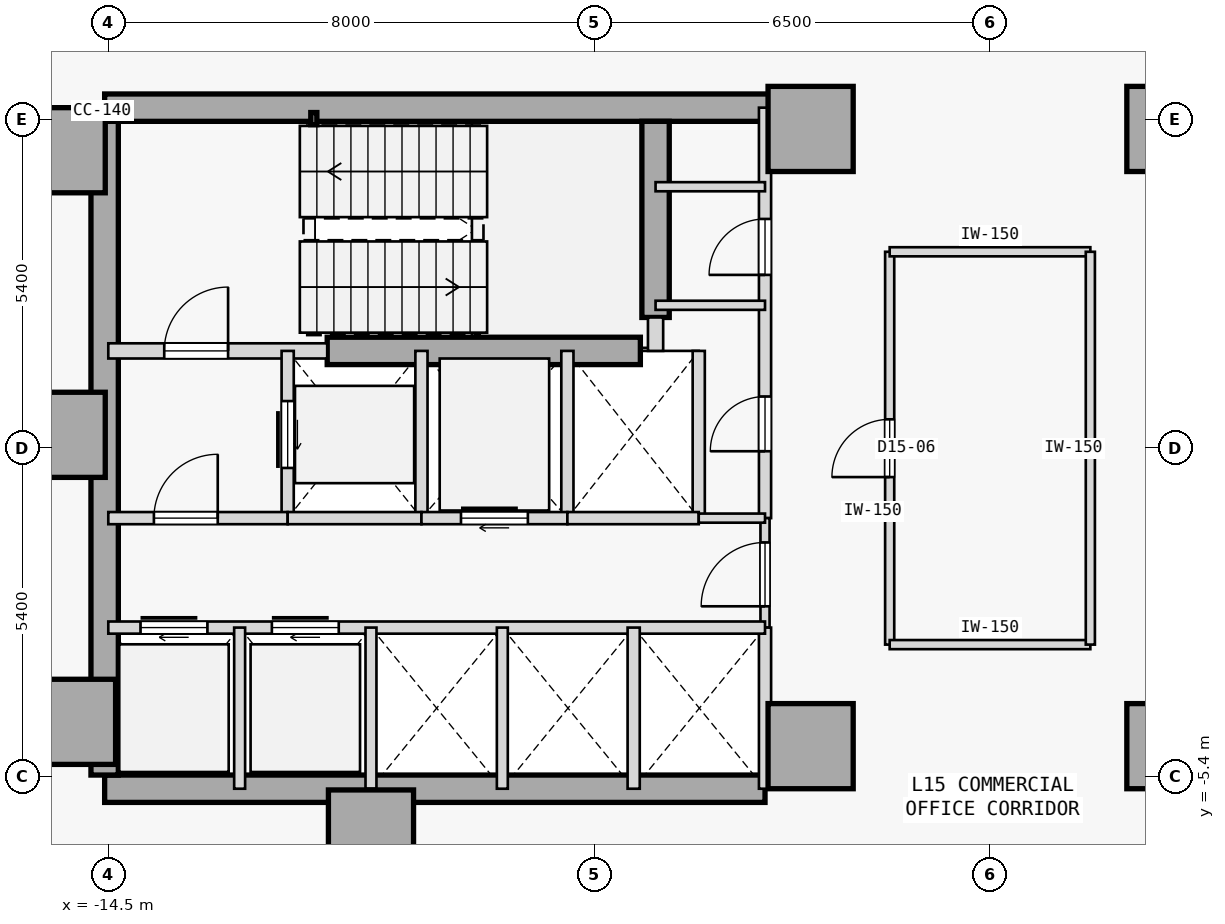
"""IFC4 building model, lengths in metres.
Left out: names, types, materials, properties, quantities, classifications, styles, units other than length and angle.
Written with IfcOpenShell. Run it as: python <this file> out.ifc"""

import sys

from ifc_helpers import new_model, si_unit, direction, frame, frame_2d, origin, origin_2d, place, context, subcontext, project, spatial, rectangle, hollow_rectangle, extrude, element, fill, save


model = new_model("IFC4")
c1 = context("Model", 3, precision=1e-05, world=origin(), true_north=direction((0.0, 1.0)))
c2 = subcontext(c1, "Body", "Model", "MODEL_VIEW")
j1 = project(units=[si_unit("LENGTHUNIT", "METRE"), si_unit("PLANEANGLEUNIT", "RADIAN")], contexts=[c1])
p1 = place(None, origin())
s1 = spatial("IfcSite", under=j1, at=p1, CompositionType="ELEMENT")
p2 = place(p1, origin())
s2 = spatial("IfcBuilding", under=s1, at=p2, CompositionType="ELEMENT")
p3 = place(p2, frame((0.0, 0.0, 63.6)))
s3 = spatial("IfcBuildingStorey", under=s2, at=p3, CompositionType="ELEMENT", Elevation=63.6)
for number, where, z_axis, x_axis in (
    (1, (-15.25, 4.9, 0.0), (0.0, 0.0, 1.0), (1.0, 0.0, 0.0)),
    (2, (-15.25, 0.22, 0.0), (0.0, 0.0, 1.0), (1.0, 0.0, 0.0)),
    (3, (-15.08, -4.5, 0.0), (0.0, 0.0, 1.0), (1.0, 0.0, 0.0)),
    (4, (-10.18, -6.32, 0.0), (0.0, 0.0, 1.0), (1.0, 0.0, 0.0)),
    (5, (-2.95, -4.9, 0.0), (0.0, 0.0, 1.0), (1.0, 0.0, 0.0)),
    (6, (-2.95, 5.25, 0.0), (0.0, 0.0, 1.0), (1.0, 0.0, 0.0)),
    (7, (2.95, -4.9, 0.0), (0.0, 0.0, 1.0), (1.0, 0.0, 0.0)),
    (8, (2.95, 5.25, 0.0), (0.0, 0.0, 1.0), (1.0, 0.0, 0.0)),
):
    element("IfcColumn", number, at=place(p3, frame(where, z_axis=z_axis, x_axis=x_axis)), inside=s3, PredefinedType="COLUMN", context=c2, shape_type="SweptSolid", body=[
        extrude(rectangle(XDim=1.4, YDim=1.4, at=origin_2d()), origin(), (0.0, 0.0, 1.0), 3.8),
    ])
p4 = place(p3, frame((-14.56, 5.6, 0.0), z_axis=(0.0, 0.0, 1.0), x_axis=(1.0, 0.0, 0.0)))
e9 = element("IfcWall", 9, at=p4, inside=s3, PredefinedType="SHEAR", context=c2, shape_type="SweptSolid", body=[
    extrude(rectangle(XDim=11.41, YDim=0.45, at=frame_2d((5.705, 0.0))), origin(), (0.0, 0.0, 1.0), 3.575),
])
p5 = place(p3, frame((-14.56, -5.6, 0.0), z_axis=(0.0, 0.0, 1.0), x_axis=(1.0, 0.0, 0.0)))
e10 = element("IfcWall", 10, at=p5, inside=s3, PredefinedType="SHEAR", context=c2, shape_type="SweptSolid", body=[
    extrude(rectangle(XDim=10.86, YDim=0.45, at=frame_2d((5.43, 0.0))), origin(), (0.0, 0.0, 1.0), 3.575),
])
p6 = place(p3, frame((-14.56, -5.375, 0.0), z_axis=(0.0, 0.0, 1.0), x_axis=(0.0, 1.0, 0.0)))
e11 = element("IfcWall", 11, at=p6, inside=s3, PredefinedType="SHEAR", context=c2, shape_type="SweptSolid", body=[
    extrude(rectangle(XDim=10.75, YDim=0.45, at=frame_2d((5.375, 0.0))), origin(), (0.0, 0.0, 1.0), 3.575),
])
p7 = place(p3, frame((-5.5, 2.15, 0.0), z_axis=(0.0, 0.0, 1.0), x_axis=(0.0, 1.0, 0.0)))
e12 = element("IfcWall", 12, at=p7, inside=s3, PredefinedType="SHEAR", context=c2, shape_type="SweptSolid", body=[
    extrude(rectangle(XDim=3.225, YDim=0.45, at=frame_2d((1.613, 0.0))), origin(), (0.0, 0.0, 1.0), 3.575),
])
p8 = place(p3, frame((-10.9, 1.6, 0.0), z_axis=(0.0, 0.0, 1.0), x_axis=(1.0, 0.0, 0.0)))
e13 = element("IfcWall", 13, at=p8, inside=s3, PredefinedType="SHEAR", context=c2, shape_type="SweptSolid", body=[
    extrude(rectangle(XDim=5.15, YDim=0.45, at=frame_2d((2.575, 0.0))), origin(), (0.0, 0.0, 1.0), 3.575),
])
p9 = place(p3, frame((-11.12, 5.42, 0.0), z_axis=(0.0, 0.0, 1.0), x_axis=(1.0, 0.0, 0.0)))
e14 = element("IfcColumn", 14, at=p9, inside=s3, PredefinedType="COLUMN", context=c2, shape_type="SweptSolid", body=[
    extrude(hollow_rectangle(XDim=0.1, YDim=0.2, WallThickness=0.008, at=origin_2d()), origin(), (0.0, 0.0, 1.0), 3.8),
])
p10 = place(p3, frame((-14.5, 1.6, 0.0), z_axis=(0.0, 0.0, 1.0), x_axis=(1.0, 0.0, 0.0)))
e15 = element("IfcWall", 15, at=p10, inside=s3, PredefinedType="STANDARD", context=c2, shape_type="SweptSolid", body=[
    extrude(rectangle(XDim=3.6, YDim=0.25, at=frame_2d((1.8, 0.0))), origin(), (0.0, 0.0, 1.0), 3.575),
])
p11 = place(p10, frame((0.92, 0.0, 0.0)))
e16 = element("IfcOpeningElement", 16, at=p11, cuts=e15, PredefinedType="OPENING", context=c2, shape_type="SweptSolid", body=[
    extrude(rectangle(XDim=1.05, YDim=2.15, at=frame_2d((0.525, 1.075))), frame((0.0, 0.135, 0.0), z_axis=(0.0, -1.0, 0.0), x_axis=(1.0, 0.0, 0.0)), (0.0, 0.0, 1.0), 0.27),
])
p12 = place(p3, frame((-5.5, 1.6, 0.0), z_axis=(0.0, 0.0, 1.0), x_axis=(0.0, 1.0, 0.0)))
e17 = element("IfcWall", 17, at=p12, inside=s3, PredefinedType="STANDARD", context=c2, shape_type="SweptSolid", body=[
    extrude(rectangle(XDim=0.55, YDim=0.25, at=frame_2d((0.275, 0.0))), origin(), (0.0, 0.0, 1.0), 3.575),
])
p13 = place(p3, frame((-3.7, -1.15, 0.0), z_axis=(0.0, 0.0, 1.0), x_axis=(0.0, 1.0, 0.0)))
e18 = element("IfcWall", 18, at=p13, inside=s3, PredefinedType="STANDARD", context=c2, shape_type="SweptSolid", body=[
    extrude(rectangle(XDim=6.75, YDim=0.2, at=frame_2d((3.375, 0.0))), origin(), (0.0, 0.0, 1.0), 3.575),
])
p14 = place(p13, frame((1.1, 0.0, 0.0)))
e19 = element("IfcOpeningElement", 19, at=p14, cuts=e18, PredefinedType="OPENING", context=c2, shape_type="SweptSolid", body=[
    extrude(rectangle(XDim=0.9, YDim=2.15, at=frame_2d((0.45, 1.075))), frame((0.0, 0.11, 0.0), z_axis=(0.0, -1.0, 0.0), x_axis=(1.0, 0.0, 0.0)), (0.0, 0.0, 1.0), 0.22),
])
p15 = place(p13, frame((4.0, 0.0, 0.0)))
e20 = element("IfcOpeningElement", 20, at=p15, cuts=e18, PredefinedType="OPENING", context=c2, shape_type="SweptSolid", body=[
    extrude(rectangle(XDim=0.92, YDim=2.15, at=frame_2d((0.46, 1.075))), frame((0.0, 0.11, 0.0), z_axis=(0.0, -1.0, 0.0), x_axis=(1.0, 0.0, 0.0)), (0.0, 0.0, 1.0), 0.22),
])
p16 = place(p3, frame((-3.7, -2.95, 0.0), z_axis=(0.0, 0.0, 1.0), x_axis=(0.0, 1.0, 0.0)))
e21 = element("IfcWall", 21, at=p16, inside=s3, PredefinedType="PARTITIONING", context=c2, shape_type="SweptSolid", body=[
    extrude(rectangle(XDim=1.8, YDim=0.15, at=frame_2d((0.9, 0.0))), origin(), (0.0, 0.0, 1.0), 3.575),
])
p17 = place(p16, frame((0.35, 0.0, 0.0)))
e22 = element("IfcOpeningElement", 22, at=p17, cuts=e21, PredefinedType="OPENING", context=c2, shape_type="SweptSolid", body=[
    extrude(rectangle(XDim=1.05, YDim=2.18, at=frame_2d((0.525, 1.09))), frame((0.0, 0.085, 0.0), z_axis=(0.0, -1.0, 0.0), x_axis=(1.0, 0.0, 0.0)), (0.0, 0.0, 1.0), 0.17),
])
p18 = place(p3, frame((-3.7, -5.6, 0.0), z_axis=(0.0, 0.0, 1.0), x_axis=(0.0, 1.0, 0.0)))
e23 = element("IfcWall", 23, at=p18, inside=s3, PredefinedType="STANDARD", context=c2, shape_type="SweptSolid", body=[
    extrude(rectangle(XDim=2.65, YDim=0.2, at=frame_2d((1.325, 0.0))), origin(), (0.0, 0.0, 1.0), 3.575),
])
p19 = place(p3, frame((-11.55, -1.15, 0.0), z_axis=(0.0, 0.0, 1.0), x_axis=(0.0, 1.0, 0.0)))
e24 = element("IfcWall", 24, at=p19, inside=s3, PredefinedType="STANDARD", context=c2, shape_type="SweptSolid", body=[
    extrude(rectangle(XDim=2.75, YDim=0.2, at=frame_2d((1.375, 0.0))), origin(), (0.0, 0.0, 1.0), 3.575),
])
p20 = place(p19, frame((0.825, 0.0, 0.0)))
e25 = element("IfcOpeningElement", 25, at=p20, cuts=e24, PredefinedType="OPENING", context=c2, shape_type="SweptSolid", body=[
    extrude(rectangle(XDim=1.1, YDim=2.15, at=frame_2d((0.55, 1.075))), frame((0.0, 0.11, 0.0), z_axis=(0.0, -1.0, 0.0), x_axis=(1.0, 0.0, 0.0)), (0.0, 0.0, 1.0), 0.22),
])
p21 = place(p3, frame((-9.35, -1.15, 0.0), z_axis=(0.0, 0.0, 1.0), x_axis=(0.0, 1.0, 0.0)))
e26 = element("IfcWall", 26, at=p21, inside=s3, PredefinedType="STANDARD", context=c2, shape_type="SweptSolid", body=[
    extrude(rectangle(XDim=2.75, YDim=0.2, at=frame_2d((1.375, 0.0))), origin(), (0.0, 0.0, 1.0), 3.575),
])
p22 = place(p3, frame((-14.5, -1.15, 0.0), z_axis=(0.0, 0.0, 1.0), x_axis=(1.0, 0.0, 0.0)))
e27 = element("IfcWall", 27, at=p22, inside=s3, PredefinedType="STANDARD", context=c2, shape_type="SweptSolid", body=[
    extrude(rectangle(XDim=2.95, YDim=0.2, at=frame_2d((1.475, 0.0))), origin(), (0.0, 0.0, 1.0), 3.575),
])
p23 = place(p22, frame((0.75, 0.0, 0.0)))
e28 = element("IfcOpeningElement", 28, at=p23, cuts=e27, PredefinedType="OPENING", context=c2, shape_type="SweptSolid", body=[
    extrude(rectangle(XDim=1.05, YDim=2.18, at=frame_2d((0.525, 1.09))), frame((0.0, 0.11, 0.0), z_axis=(0.0, -1.0, 0.0), x_axis=(1.0, 0.0, 0.0)), (0.0, 0.0, 1.0), 0.22),
])
p24 = place(p3, frame((-11.55, -1.15, 0.0), z_axis=(0.0, 0.0, 1.0), x_axis=(1.0, 0.0, 0.0)))
e29 = element("IfcWall", 29, at=p24, inside=s3, PredefinedType="STANDARD", context=c2, shape_type="SweptSolid", body=[
    extrude(rectangle(XDim=2.2, YDim=0.2, at=frame_2d((1.1, 0.0))), origin(), (0.0, 0.0, 1.0), 3.575),
])
p25 = place(p3, frame((-6.95, -1.15, 0.0), z_axis=(0.0, 0.0, 1.0), x_axis=(0.0, 1.0, 0.0)))
e30 = element("IfcWall", 30, at=p25, inside=s3, PredefinedType="STANDARD", context=c2, shape_type="SweptSolid", body=[
    extrude(rectangle(XDim=2.75, YDim=0.2, at=frame_2d((1.375, 0.0))), origin(), (0.0, 0.0, 1.0), 3.575),
])
p26 = place(p3, frame((-9.35, -1.15, 0.0), z_axis=(0.0, 0.0, 1.0), x_axis=(1.0, 0.0, 0.0)))
e31 = element("IfcWall", 31, at=p26, inside=s3, PredefinedType="STANDARD", context=c2, shape_type="SweptSolid", body=[
    extrude(rectangle(XDim=2.4, YDim=0.2, at=frame_2d((1.2, 0.0))), origin(), (0.0, 0.0, 1.0), 3.575),
])
p27 = place(p26, frame((0.65, 0.0, 0.0)))
e32 = element("IfcOpeningElement", 32, at=p27, cuts=e31, PredefinedType="OPENING", context=c2, shape_type="SweptSolid", body=[
    extrude(rectangle(XDim=1.1, YDim=2.15, at=frame_2d((0.55, 1.075))), frame((0.0, 0.11, 0.0), z_axis=(0.0, -1.0, 0.0), x_axis=(1.0, 0.0, 0.0)), (0.0, 0.0, 1.0), 0.22),
])
p28 = place(p3, frame((-4.79, -1.15, 0.0), z_axis=(0.0, 0.0, 1.0), x_axis=(0.0, 1.0, 0.0)))
e33 = element("IfcWall", 33, at=p28, inside=s3, PredefinedType="STANDARD", context=c2, shape_type="SweptSolid", body=[
    extrude(rectangle(XDim=2.75, YDim=0.2, at=frame_2d((1.375, 0.0))), origin(), (0.0, 0.0, 1.0), 3.575),
])
p29 = place(p3, frame((-6.95, -1.15, 0.0), z_axis=(0.0, 0.0, 1.0), x_axis=(1.0, 0.0, 0.0)))
e34 = element("IfcWall", 34, at=p29, inside=s3, PredefinedType="STANDARD", context=c2, shape_type="SweptSolid", body=[
    extrude(rectangle(XDim=2.16, YDim=0.2, at=frame_2d((1.08, 0.0))), origin(), (0.0, 0.0, 1.0), 3.575),
])
p30 = place(p3, frame((-4.79, -1.15, 0.0), z_axis=(0.0, 0.0, 1.0), x_axis=(1.0, 0.0, 0.0)))
e35 = element("IfcWall", 35, at=p30, inside=s3, PredefinedType="PARTITIONING", context=c2, shape_type="SweptSolid", body=[
    extrude(rectangle(XDim=1.09, YDim=0.15, at=frame_2d((0.545, 0.0))), origin(), (0.0, 0.0, 1.0), 3.575),
])
p31 = place(p3, frame((-14.5, -2.95, 0.0), z_axis=(0.0, 0.0, 1.0), x_axis=(1.0, 0.0, 0.0)))
e36 = element("IfcWall", 36, at=p31, inside=s3, PredefinedType="STANDARD", context=c2, shape_type="SweptSolid", body=[
    extrude(rectangle(XDim=10.8, YDim=0.2, at=frame_2d((5.4, 0.0))), origin(), (0.0, 0.0, 1.0), 3.575),
])
p32 = place(p31, frame((0.53, 0.0, 0.0)))
e37 = element("IfcOpeningElement", 37, at=p32, cuts=e36, PredefinedType="OPENING", context=c2, shape_type="SweptSolid", body=[
    extrude(rectangle(XDim=1.1, YDim=2.15, at=frame_2d((0.55, 1.075))), frame((0.0, 0.11, 0.0), z_axis=(0.0, -1.0, 0.0), x_axis=(1.0, 0.0, 0.0)), (0.0, 0.0, 1.0), 0.22),
])
p33 = place(p31, frame((2.69, 0.0, 0.0)))
e38 = element("IfcOpeningElement", 38, at=p33, cuts=e36, PredefinedType="OPENING", context=c2, shape_type="SweptSolid", body=[
    extrude(rectangle(XDim=1.1, YDim=2.15, at=frame_2d((0.55, 1.075))), frame((0.0, 0.11, 0.0), z_axis=(0.0, -1.0, 0.0), x_axis=(1.0, 0.0, 0.0)), (0.0, 0.0, 1.0), 0.22),
])
p34 = place(p3, frame((-5.86, -5.6, 0.0), z_axis=(0.0, 0.0, 1.0), x_axis=(0.0, 1.0, 0.0)))
e39 = element("IfcWall", 39, at=p34, inside=s3, PredefinedType="STANDARD", context=c2, shape_type="SweptSolid", body=[
    extrude(rectangle(XDim=2.65, YDim=0.2, at=frame_2d((1.325, 0.0))), origin(), (0.0, 0.0, 1.0), 3.575),
])
for number, where, z_axis, x_axis in (
    (40, (-12.34, -5.6, 0.0), (0.0, 0.0, 1.0), (0.0, 1.0, 0.0)),
    (41, (-10.18, -5.6, 0.0), (0.0, 0.0, 1.0), (0.0, 1.0, 0.0)),
    (42, (-8.02, -5.6, 0.0), (0.0, 0.0, 1.0), (0.0, 1.0, 0.0)),
):
    element("IfcWall", number, at=place(p3, frame(where, z_axis=z_axis, x_axis=x_axis)), inside=s3, PredefinedType="STANDARD", context=c2, shape_type="SweptSolid", body=[
        extrude(rectangle(XDim=2.65, YDim=0.18, at=frame_2d((1.325, 0.0))), origin(), (0.0, 0.0, 1.0), 3.575),
    ])
for number, where, z_axis, x_axis in (
    (43, (-5.5, 4.3, 0.0), (0.0, 0.0, 1.0), (1.0, 0.0, 0.0)),
    (44, (-5.5, 2.35, 0.0), (0.0, 0.0, 1.0), (1.0, 0.0, 0.0)),
):
    element("IfcWall", number, at=place(p3, frame(where, z_axis=z_axis, x_axis=x_axis)), inside=s3, PredefinedType="PARTITIONING", context=c2, shape_type="SweptSolid", body=[
        extrude(rectangle(XDim=1.8, YDim=0.15, at=frame_2d((0.9, 0.0))), origin(), (0.0, 0.0, 1.0), 3.575),
    ])
p35 = place(p3, frame((-1.65, -3.23, 0.0), z_axis=(0.0, 0.0, 1.0), x_axis=(0.0, 1.0, 0.0)))
e45 = element("IfcWall", 45, at=p35, inside=s3, PredefinedType="PARTITIONING", context=c2, shape_type="SweptSolid", body=[
    extrude(rectangle(XDim=6.46, YDim=0.15, at=frame_2d((3.23, 0.0))), origin(), (0.0, 0.0, 1.0), 3.575),
])
p36 = place(p35, frame((2.755, 0.0, 0.0)))
e46 = element("IfcOpeningElement", 46, at=p36, cuts=e45, PredefinedType="OPENING", context=c2, shape_type="SweptSolid", body=[
    extrude(rectangle(XDim=0.95, YDim=2.15, at=frame_2d((0.475, 1.075))), frame((0.0, 0.085, 0.0), z_axis=(0.0, -1.0, 0.0), x_axis=(1.0, 0.0, 0.0)), (0.0, 0.0, 1.0), 0.17),
])
for number, where, z_axis, x_axis in (
    (47, (-1.65, -3.23, 0.0), (0.0, 0.0, 1.0), (1.0, 0.0, 0.0)),
    (48, (-1.65, 3.23, 0.0), (0.0, 0.0, 1.0), (1.0, 0.0, 0.0)),
):
    element("IfcWall", number, at=place(p3, frame(where, z_axis=z_axis, x_axis=x_axis)), inside=s3, PredefinedType="PARTITIONING", context=c2, shape_type="SweptSolid", body=[
        extrude(rectangle(XDim=3.3, YDim=0.15, at=frame_2d((1.65, 0.0))), origin(), (0.0, 0.0, 1.0), 3.575),
    ])
p37 = place(p3, frame((1.65, -3.23, 0.0), z_axis=(0.0, 0.0, 1.0), x_axis=(0.0, 1.0, 0.0)))
e49 = element("IfcWall", 49, at=p37, inside=s3, PredefinedType="PARTITIONING", context=c2, shape_type="SweptSolid", body=[
    extrude(rectangle(XDim=6.46, YDim=0.15, at=frame_2d((3.23, 0.0))), origin(), (0.0, 0.0, 1.0), 3.575),
])
p38 = place(p11, origin())
e50 = element("IfcDoor", 50, at=p38, inside=s3, OperationType="SINGLE_SWING_RIGHT", PredefinedType="DOOR", context=c2, shape_type="SweptSolid", body=[
    extrude(rectangle(XDim=1.05, YDim=2.15, at=frame_2d((0.525, 1.075))), frame((0.0, 0.025, 0.0), z_axis=(0.0, -1.0, 0.0), x_axis=(1.0, 0.0, 0.0)), (0.0, 0.0, 1.0), 0.05),
])
fill(e16, e50)
p39 = place(p23, origin())
e51 = element("IfcDoor", 51, at=p39, inside=s3, OperationType="SINGLE_SWING_RIGHT", PredefinedType="DOOR", context=c2, shape_type="SweptSolid", body=[
    extrude(rectangle(XDim=1.05, YDim=2.18, at=frame_2d((0.525, 1.09))), frame((0.0, 0.025, 0.0), z_axis=(0.0, -1.0, 0.0), x_axis=(1.0, 0.0, 0.0)), (0.0, 0.0, 1.0), 0.05),
])
fill(e28, e51)
p40 = place(p17, origin())
e52 = element("IfcDoor", 52, at=p40, inside=s3, OperationType="SINGLE_SWING_LEFT", PredefinedType="DOOR", context=c2, shape_type="SweptSolid", body=[
    extrude(rectangle(XDim=1.05, YDim=2.18, at=frame_2d((0.525, 1.09))), frame((0.0, 0.025, 0.0), z_axis=(0.0, -1.0, 0.0), x_axis=(1.0, 0.0, 0.0)), (0.0, 0.0, 1.0), 0.05),
])
fill(e22, e52)
p41 = place(p20, origin())
e53 = element("IfcDoor", 53, at=p41, inside=s3, OperationType="SLIDING_TO_RIGHT", PredefinedType="DOOR", context=c2, shape_type="SweptSolid", body=[
    extrude(rectangle(XDim=1.1, YDim=2.15, at=frame_2d((0.55, 1.075))), frame((0.0, 0.025, 0.0), z_axis=(0.0, -1.0, 0.0), x_axis=(1.0, 0.0, 0.0)), (0.0, 0.0, 1.0), 0.05),
])
fill(e25, e53)
p42 = place(p27, origin())
e54 = element("IfcDoor", 54, at=p42, inside=s3, OperationType="SLIDING_TO_RIGHT", PredefinedType="DOOR", context=c2, shape_type="SweptSolid", body=[
    extrude(rectangle(XDim=1.1, YDim=2.15, at=frame_2d((0.55, 1.075))), frame((0.0, 0.025, 0.0), z_axis=(0.0, -1.0, 0.0), x_axis=(1.0, 0.0, 0.0)), (0.0, 0.0, 1.0), 0.05),
])
fill(e32, e54)
p43 = place(p32, origin())
e55 = element("IfcDoor", 55, at=p43, inside=s3, OperationType="SLIDING_TO_RIGHT", PredefinedType="DOOR", context=c2, shape_type="SweptSolid", body=[
    extrude(rectangle(XDim=1.1, YDim=2.15, at=frame_2d((0.55, 1.075))), frame((0.0, 0.025, 0.0), z_axis=(0.0, -1.0, 0.0), x_axis=(1.0, 0.0, 0.0)), (0.0, 0.0, 1.0), 0.05),
])
fill(e37, e55)
p44 = place(p33, origin())
e56 = element("IfcDoor", 56, at=p44, inside=s3, OperationType="SLIDING_TO_RIGHT", PredefinedType="DOOR", context=c2, shape_type="SweptSolid", body=[
    extrude(rectangle(XDim=1.1, YDim=2.15, at=frame_2d((0.55, 1.075))), frame((0.0, 0.025, 0.0), z_axis=(0.0, -1.0, 0.0), x_axis=(1.0, 0.0, 0.0)), (0.0, 0.0, 1.0), 0.05),
])
fill(e38, e56)
p45 = place(p14, origin())
e57 = element("IfcDoor", 57, at=p45, inside=s3, OperationType="SINGLE_SWING_LEFT", PredefinedType="DOOR", context=c2, shape_type="SweptSolid", body=[
    extrude(rectangle(XDim=0.9, YDim=2.15, at=frame_2d((0.45, 1.075))), frame((0.0, 0.025, 0.0), z_axis=(0.0, -1.0, 0.0), x_axis=(1.0, 0.0, 0.0)), (0.0, 0.0, 1.0), 0.05),
])
fill(e19, e57)
p46 = place(p15, origin())
e58 = element("IfcDoor", 58, at=p46, inside=s3, OperationType="SINGLE_SWING_LEFT", PredefinedType="DOOR", context=c2, shape_type="SweptSolid", body=[
    extrude(rectangle(XDim=0.92, YDim=2.15, at=frame_2d((0.46, 1.075))), frame((0.0, 0.025, 0.0), z_axis=(0.0, -1.0, 0.0), x_axis=(1.0, 0.0, 0.0)), (0.0, 0.0, 1.0), 0.05),
])
fill(e20, e58)
p47 = place(p36, origin())
e59 = element("IfcDoor", 59, at=p47, inside=s3, OperationType="SINGLE_SWING_LEFT", PredefinedType="DOOR", context=c2, shape_type="SweptSolid", body=[
    extrude(rectangle(XDim=0.95, YDim=2.15, at=frame_2d((0.475, 1.075))), frame((0.0, 0.025, 0.0), z_axis=(0.0, -1.0, 0.0), x_axis=(1.0, 0.0, 0.0)), (0.0, 0.0, 1.0), 0.05),
])
fill(e46, e59)
save(model, sys.argv[1])
